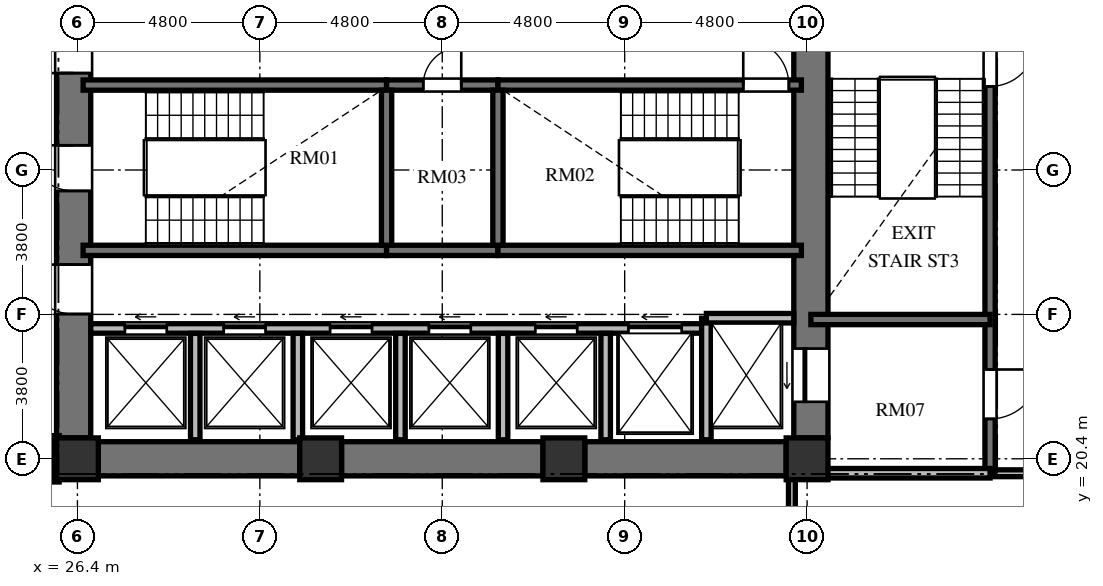
"""IFC4 building model, lengths in metres.
Left out: names, types, materials, properties, quantities, classifications, styles, units other than length and angle.
Written with IfcOpenShell. Run it as: python <this file> out.ifc"""

import sys

from ifc_helpers import new_model, si_unit, direction, frame, frame_2d, origin, origin_2d, place, context, subcontext, project, spatial, rectangle, extrude, element, fill, save


model = new_model("IFC4")
c1 = context("Model", 3, precision=1e-05, world=origin(), true_north=direction((0.0, 1.0)))
c2 = subcontext(c1, "Body", "Model", "MODEL_VIEW")
j1 = project(units=[si_unit("LENGTHUNIT", "METRE"), si_unit("PLANEANGLEUNIT", "RADIAN")], contexts=[c1])
p1 = place(None, origin())
s1 = spatial("IfcSite", under=j1, at=p1, CompositionType="ELEMENT")
p2 = place(p1, origin())
s2 = spatial("IfcBuilding", under=s1, at=p2, CompositionType="ELEMENT")
p3 = place(p2, frame((0.0, 0.0, 72.624)))
s3 = spatial("IfcBuildingStorey", under=s2, at=p3, CompositionType="ELEMENT", Elevation=72.624)
for number, where, z_axis, x_axis in (
    (1, (26.4, 20.4, 0.0), (0.0, 0.0, 1.0), (1.0, 0.0, 0.0)),
    (2, (32.8, 20.4, 0.0), (0.0, 0.0, 1.0), (1.0, 0.0, 0.0)),
    (3, (39.2, 20.4, 0.0), (0.0, 0.0, 1.0), (1.0, 0.0, 0.0)),
    (4, (45.6, 20.4, 0.0), (0.0, 0.0, 1.0), (1.0, 0.0, 0.0)),
):
    element("IfcColumn", number, at=place(p3, frame(where, z_axis=z_axis, x_axis=x_axis)), inside=s3, PredefinedType="COLUMN", context=c2, shape_type="SweptSolid", body=[
        extrude(rectangle(XDim=1.1, YDim=1.1, at=origin_2d()), origin(), (0.0, 0.0, 1.0), 3.648),
    ])
p4 = place(p3, frame((26.3, 20.95, 0.0), z_axis=(0.0, 0.0, 1.0), x_axis=(0.0, 1.0, 0.0)))
e5 = element("IfcWall", 5, at=p4, inside=s3, PredefinedType="SHEAR", context=c2, shape_type="SweptSolid", body=[
    extrude(rectangle(XDim=14.1, YDim=0.9, at=frame_2d((7.05, 0.0))), origin(), (0.0, 0.0, 1.0), 3.648),
])
p5 = place(p4, frame((6.5, 0.0, 0.0)))
e6 = element("IfcOpeningElement", 6, at=p5, cuts=e5, PredefinedType="OPENING", context=c2, shape_type="SweptSolid", body=[
    extrude(rectangle(XDim=1.2, YDim=2.15, at=frame_2d((0.6, 1.075))), frame((0.0, 0.46, 0.0), z_axis=(0.0, -1.0, 0.0), x_axis=(1.0, 0.0, 0.0)), (0.0, 0.0, 1.0), 0.92),
])
p6 = place(p4, frame((9.6, 0.0, 0.0)))
e7 = element("IfcOpeningElement", 7, at=p6, cuts=e5, PredefinedType="OPENING", context=c2, shape_type="SweptSolid", body=[
    extrude(rectangle(XDim=1.3, YDim=2.2, at=frame_2d((0.65, 1.1))), frame((0.0, 0.46, 0.0), z_axis=(0.0, -1.0, 0.0), x_axis=(1.0, 0.0, 0.0)), (0.0, 0.0, 1.0), 0.92),
])
p7 = place(p4, frame((3.26, 0.0, 0.0)))
e8 = element("IfcOpeningElement", 8, at=p7, cuts=e5, PredefinedType="OPENING", context=c2, shape_type="SweptSolid", body=[
    extrude(rectangle(XDim=1.3, YDim=2.2, at=frame_2d((0.65, 1.1))), frame((0.0, 0.46, 0.0), z_axis=(0.0, -1.0, 0.0), x_axis=(1.0, 0.0, 0.0)), (0.0, 0.0, 1.0), 0.92),
])
p8 = place(p3, frame((45.7, 20.95, 0.0), z_axis=(0.0, 0.0, 1.0), x_axis=(0.0, 1.0, 0.0)))
e9 = element("IfcWall", 9, at=p8, inside=s3, PredefinedType="SHEAR", context=c2, shape_type="SweptSolid", body=[
    extrude(rectangle(XDim=14.1, YDim=0.9, at=frame_2d((7.05, 0.0))), origin(), (0.0, 0.0, 1.0), 3.648),
])
p9 = place(p8, frame((11.75, 0.0, 0.0)))
e10 = element("IfcOpeningElement", 10, at=p9, cuts=e9, PredefinedType="OPENING", context=c2, shape_type="SweptSolid", body=[
    extrude(rectangle(XDim=1.4, YDim=2.3, at=frame_2d((0.7, 1.15))), frame((0.0, 0.46, 0.0), z_axis=(0.0, -1.0, 0.0), x_axis=(1.0, 0.0, 0.0)), (0.0, 0.0, 1.0), 0.92),
])
p10 = place(p8, frame((0.95, 0.0, 0.0)))
e11 = element("IfcOpeningElement", 11, at=p10, cuts=e9, PredefinedType="OPENING", context=c2, shape_type="SweptSolid", body=[
    extrude(rectangle(XDim=1.4, YDim=2.3, at=frame_2d((0.7, 1.15))), frame((0.0, 0.46, 0.0), z_axis=(0.0, -1.0, 0.0), x_axis=(1.0, 0.0, 0.0)), (0.0, 0.0, 1.0), 0.92),
])
p11 = place(p3, frame((26.95, 20.4, 0.0), z_axis=(0.0, 0.0, 1.0), x_axis=(1.0, 0.0, 0.0)))
e12 = element("IfcWall", 12, at=p11, inside=s3, PredefinedType="SHEAR", context=c2, shape_type="SweptSolid", body=[
    extrude(rectangle(XDim=5.3, YDim=0.9, at=frame_2d((2.65, 0.0))), origin(), (0.0, 0.0, 1.0), 3.648),
])
p12 = place(p3, frame((33.35, 20.4, 0.0), z_axis=(0.0, 0.0, 1.0), x_axis=(1.0, 0.0, 0.0)))
e13 = element("IfcWall", 13, at=p12, inside=s3, PredefinedType="SHEAR", context=c2, shape_type="SweptSolid", body=[
    extrude(rectangle(XDim=5.3, YDim=0.9, at=frame_2d((2.65, 0.0))), origin(), (0.0, 0.0, 1.0), 3.648),
])
p13 = place(p3, frame((39.75, 20.4, 0.0), z_axis=(0.0, 0.0, 1.0), x_axis=(1.0, 0.0, 0.0)))
e14 = element("IfcWall", 14, at=p13, inside=s3, PredefinedType="SHEAR", context=c2, shape_type="SweptSolid", body=[
    extrude(rectangle(XDim=5.3, YDim=0.9, at=frame_2d((2.65, 0.0))), origin(), (0.0, 0.0, 1.0), 3.648),
])
p14 = place(p3, frame((26.55, 30.235, 0.0), z_axis=(0.0, 0.0, 1.0), x_axis=(1.0, 0.0, 0.0)))
e15 = element("IfcWall", 15, at=p14, inside=s3, PredefinedType="SHEAR", context=c2, shape_type="SweptSolid", body=[
    extrude(rectangle(XDim=7.985, YDim=0.27, at=frame_2d((3.992, 0.0))), origin(), (0.0, 0.0, 1.0), 3.648),
])
p15 = place(p3, frame((34.535, 30.235, 0.0), z_axis=(0.0, 0.0, 1.0), x_axis=(1.0, 0.0, 0.0)))
e16 = element("IfcWall", 16, at=p15, inside=s3, PredefinedType="SHEAR", context=c2, shape_type="SweptSolid", body=[
    extrude(rectangle(XDim=2.93, YDim=0.27, at=frame_2d((1.465, 0.0))), origin(), (0.0, 0.0, 1.0), 3.648),
])
p16 = place(p15, frame((0.965, 0.0, 0.0)))
e17 = element("IfcOpeningElement", 17, at=p16, cuts=e16, PredefinedType="OPENING", context=c2, shape_type="SweptSolid", body=[
    extrude(rectangle(XDim=1.0, YDim=2.1, at=frame_2d((0.5, 1.05))), frame((0.0, 0.145, 0.0), z_axis=(0.0, -1.0, 0.0), x_axis=(1.0, 0.0, 0.0)), (0.0, 0.0, 1.0), 0.29),
])
p17 = place(p3, frame((37.465, 30.235, 0.0), z_axis=(0.0, 0.0, 1.0), x_axis=(1.0, 0.0, 0.0)))
e18 = element("IfcWall", 18, at=p17, inside=s3, PredefinedType="SHEAR", context=c2, shape_type="SweptSolid", body=[
    extrude(rectangle(XDim=7.985, YDim=0.27, at=frame_2d((3.992, 0.0))), origin(), (0.0, 0.0, 1.0), 3.648),
])
p18 = place(p17, frame((6.455, 0.0, 0.0)))
e19 = element("IfcOpeningElement", 19, at=p18, cuts=e18, PredefinedType="OPENING", context=c2, shape_type="SweptSolid", body=[
    extrude(rectangle(XDim=1.2, YDim=2.15, at=frame_2d((0.6, 1.075))), frame((0.0, 0.145, 0.0), z_axis=(0.0, -1.0, 0.0), x_axis=(1.0, 0.0, 0.0)), (0.0, 0.0, 1.0), 0.29),
])
p19 = place(p3, frame((26.55, 25.885, 0.0), z_axis=(0.0, 0.0, 1.0), x_axis=(1.0, 0.0, 0.0)))
e20 = element("IfcWall", 20, at=p19, inside=s3, PredefinedType="SHEAR", context=c2, shape_type="SweptSolid", body=[
    extrude(rectangle(XDim=7.985, YDim=0.27, at=frame_2d((3.992, 0.0))), origin(), (0.0, 0.0, 1.0), 3.648),
])
p20 = place(p3, frame((34.535, 25.885, 0.0), z_axis=(0.0, 0.0, 1.0), x_axis=(1.0, 0.0, 0.0)))
e21 = element("IfcWall", 21, at=p20, inside=s3, PredefinedType="SHEAR", context=c2, shape_type="SweptSolid", body=[
    extrude(rectangle(XDim=2.93, YDim=0.27, at=frame_2d((1.465, 0.0))), origin(), (0.0, 0.0, 1.0), 3.648),
])
p21 = place(p3, frame((37.465, 25.885, 0.0), z_axis=(0.0, 0.0, 1.0), x_axis=(1.0, 0.0, 0.0)))
e22 = element("IfcWall", 22, at=p21, inside=s3, PredefinedType="SHEAR", context=c2, shape_type="SweptSolid", body=[
    extrude(rectangle(XDim=7.985, YDim=0.27, at=frame_2d((3.992, 0.0))), origin(), (0.0, 0.0, 1.0), 3.648),
])
for number, where, z_axis, x_axis in (
    (23, (34.535, 26.02, 0.0), (0.0, 0.0, 1.0), (0.0, 1.0, 0.0)),
    (24, (37.465, 26.02, 0.0), (0.0, 0.0, 1.0), (0.0, 1.0, 0.0)),
):
    element("IfcWall", number, at=place(p3, frame(where, z_axis=z_axis, x_axis=x_axis)), inside=s3, PredefinedType="SHEAR", context=c2, shape_type="SweptSolid", body=[
        extrude(rectangle(XDim=4.08, YDim=0.27, at=frame_2d((2.04, 0.0))), origin(), (0.0, 0.0, 1.0), 3.648),
    ])
p22 = place(p3, frame((26.75, 23.83, 0.0), z_axis=(0.0, 0.0, 1.0), x_axis=(1.0, 0.0, 0.0)))
e25 = element("IfcWall", 25, at=p22, inside=s3, PredefinedType="SOLIDWALL", context=c2, shape_type="SweptSolid", body=[
    extrude(rectangle(XDim=16.2, YDim=0.25, at=frame_2d((8.1, 0.0))), origin(), (0.0, 0.0, 1.0), 3.198),
])
p23 = place(p22, frame((0.9, 0.0, 0.0)))
e26 = element("IfcOpeningElement", 26, at=p23, cuts=e25, PredefinedType="OPENING", context=c2, shape_type="SweptSolid", body=[
    extrude(rectangle(XDim=1.1, YDim=2.2, at=frame_2d((0.55, 1.1))), frame((0.0, 0.135, 0.0), z_axis=(0.0, -1.0, 0.0), x_axis=(1.0, 0.0, 0.0)), (0.0, 0.0, 1.0), 0.27),
])
p24 = place(p22, frame((3.5, 0.0, 0.0)))
e27 = element("IfcOpeningElement", 27, at=p24, cuts=e25, PredefinedType="OPENING", context=c2, shape_type="SweptSolid", body=[
    extrude(rectangle(XDim=1.1, YDim=2.2, at=frame_2d((0.55, 1.1))), frame((0.0, 0.135, 0.0), z_axis=(0.0, -1.0, 0.0), x_axis=(1.0, 0.0, 0.0)), (0.0, 0.0, 1.0), 0.27),
])
p25 = place(p22, frame((6.3, 0.0, 0.0)))
e28 = element("IfcOpeningElement", 28, at=p25, cuts=e25, PredefinedType="OPENING", context=c2, shape_type="SweptSolid", body=[
    extrude(rectangle(XDim=1.1, YDim=2.2, at=frame_2d((0.55, 1.1))), frame((0.0, 0.135, 0.0), z_axis=(0.0, -1.0, 0.0), x_axis=(1.0, 0.0, 0.0)), (0.0, 0.0, 1.0), 0.27),
])
p26 = place(p22, frame((8.9, 0.0, 0.0)))
e29 = element("IfcOpeningElement", 29, at=p26, cuts=e25, PredefinedType="OPENING", context=c2, shape_type="SweptSolid", body=[
    extrude(rectangle(XDim=1.1, YDim=2.2, at=frame_2d((0.55, 1.1))), frame((0.0, 0.135, 0.0), z_axis=(0.0, -1.0, 0.0), x_axis=(1.0, 0.0, 0.0)), (0.0, 0.0, 1.0), 0.27),
])
p27 = place(p22, frame((11.7, 0.0, 0.0)))
e30 = element("IfcOpeningElement", 30, at=p27, cuts=e25, PredefinedType="OPENING", context=c2, shape_type="SweptSolid", body=[
    extrude(rectangle(XDim=1.1, YDim=2.2, at=frame_2d((0.55, 1.1))), frame((0.0, 0.135, 0.0), z_axis=(0.0, -1.0, 0.0), x_axis=(1.0, 0.0, 0.0)), (0.0, 0.0, 1.0), 0.27),
])
p28 = place(p22, frame((14.15, 0.0, 0.0)))
e31 = element("IfcOpeningElement", 31, at=p28, cuts=e25, PredefinedType="OPENING", context=c2, shape_type="SweptSolid", body=[
    extrude(rectangle(XDim=1.4, YDim=2.3, at=frame_2d((0.7, 1.15))), frame((0.0, 0.135, 0.0), z_axis=(0.0, -1.0, 0.0), x_axis=(1.0, 0.0, 0.0)), (0.0, 0.0, 1.0), 0.27),
])
p29 = place(p3, frame((42.95, 20.9, 0.0), z_axis=(0.0, 0.0, 1.0), x_axis=(0.0, 1.0, 0.0)))
e32 = element("IfcWall", 32, at=p29, inside=s3, PredefinedType="SOLIDWALL", context=c2, shape_type="SweptSolid", body=[
    extrude(rectangle(XDim=3.2, YDim=0.25, at=frame_2d((1.6, 0.0))), origin(), (0.0, 0.0, 1.0), 3.198),
])
p30 = place(p3, frame((42.95, 24.1, 0.0), z_axis=(0.0, 0.0, 1.0), x_axis=(1.0, 0.0, 0.0)))
e33 = element("IfcWall", 33, at=p30, inside=s3, PredefinedType="SOLIDWALL", context=c2, shape_type="SweptSolid", body=[
    extrude(rectangle(XDim=2.3, YDim=0.25, at=frame_2d((1.15, 0.0))), origin(), (0.0, 0.0, 1.0), 3.198),
])
for number, where, z_axis, x_axis in (
    (34, (29.5, 20.9, 0.0), (0.0, 0.0, 1.0), (0.0, 1.0, 0.0)),
    (35, (32.2, 20.9, 0.0), (0.0, 0.0, 1.0), (0.0, 1.0, 0.0)),
    (36, (34.9, 20.9, 0.0), (0.0, 0.0, 1.0), (0.0, 1.0, 0.0)),
    (37, (37.6, 20.9, 0.0), (0.0, 0.0, 1.0), (0.0, 1.0, 0.0)),
    (38, (40.3, 20.9, 0.0), (0.0, 0.0, 1.0), (0.0, 1.0, 0.0)),
):
    element("IfcWall", number, at=place(p3, frame(where, z_axis=z_axis, x_axis=x_axis)), inside=s3, PredefinedType="SOLIDWALL", context=c2, shape_type="SweptSolid", body=[
        extrude(rectangle(XDim=2.8, YDim=0.25, at=frame_2d((1.4, 0.0))), origin(), (0.0, 0.0, 1.0), 3.198),
    ])
p31 = place(p3, frame((50.415, 35.845, 0.0), z_axis=(0.0, 0.0, 1.0), x_axis=(0.0, -1.0, 0.0)))
e39 = element("IfcWall", 39, at=p31, inside=s3, PredefinedType="SHEAR", context=c2, shape_type="SweptSolid", body=[
    extrude(rectangle(XDim=15.825, YDim=0.27, at=frame_2d((7.913, 0.0))), origin(), (0.0, 0.0, 1.0), 3.648),
])
p32 = place(p31, frame((4.445, 0.0, 0.0)))
e40 = element("IfcOpeningElement", 40, at=p32, cuts=e39, PredefinedType="OPENING", context=c2, shape_type="SweptSolid", body=[
    extrude(rectangle(XDim=1.2, YDim=2.15, at=frame_2d((0.6, 1.075))), frame((0.0, 0.145, 0.0), z_axis=(0.0, -1.0, 0.0), x_axis=(1.0, 0.0, 0.0)), (0.0, 0.0, 1.0), 0.29),
])
p33 = place(p31, frame((1.295, 0.0, 0.0)))
e41 = element("IfcOpeningElement", 41, at=p33, cuts=e39, PredefinedType="OPENING", context=c2, shape_type="SweptSolid", body=[
    extrude(rectangle(XDim=1.3, YDim=2.2, at=frame_2d((0.65, 1.1))), frame((0.0, 0.145, 0.0), z_axis=(0.0, -1.0, 0.0), x_axis=(1.0, 0.0, 0.0)), (0.0, 0.0, 1.0), 0.29),
])
p34 = place(p31, frame((13.095, 0.0, 0.0)))
e42 = element("IfcOpeningElement", 42, at=p34, cuts=e39, PredefinedType="OPENING", context=c2, shape_type="SweptSolid", body=[
    extrude(rectangle(XDim=1.3, YDim=2.2, at=frame_2d((0.65, 1.1))), frame((0.0, 0.145, 0.0), z_axis=(0.0, -1.0, 0.0), x_axis=(1.0, 0.0, 0.0)), (0.0, 0.0, 1.0), 0.29),
])
p35 = place(p3, frame((45.7, 24.065, 0.0), z_axis=(0.0, 0.0, 1.0), x_axis=(1.0, 0.0, 0.0)))
e43 = element("IfcWall", 43, at=p35, inside=s3, PredefinedType="SHEAR", context=c2, shape_type="SweptSolid", body=[
    extrude(rectangle(XDim=4.715, YDim=0.27, at=frame_2d((2.357, 0.0))), origin(), (0.0, 0.0, 1.0), 3.648),
])
p36 = place(p3, frame((45.7, 20.02, 0.0), z_axis=(0.0, 0.0, 1.0), x_axis=(1.0, 0.0, 0.0)))
e44 = element("IfcWall", 44, at=p36, inside=s3, PredefinedType="SOLIDWALL", context=c2, shape_type="SweptSolid", body=[
    extrude(rectangle(XDim=4.715, YDim=0.25, at=frame_2d((2.357, 0.0))), origin(), (0.0, 0.0, 1.0), 2.583),
])
p37 = place(p3, frame((53.19, 20.02, 0.0), z_axis=(0.0, 0.0, 1.0), x_axis=(-1.0, 0.0, 0.0)))
e45 = element("IfcWall", 45, at=p37, inside=s3, PredefinedType="PARTITIONING", context=c2, shape_type="SweptSolid", body=[
    extrude(rectangle(XDim=2.65, YDim=0.18, at=frame_2d((1.325, 0.0))), origin(), (0.0, 0.0, 1.0), 2.583),
])
p38 = place(p3, frame((25.83, 21.01, 0.0), z_axis=(0.0, 0.0, 1.0), x_axis=(0.0, -1.0, 0.0)))
e46 = element("IfcWall", 46, at=p38, inside=s3, PredefinedType="PARTITIONING", context=c2, shape_type="SweptSolid", body=[
    extrude(rectangle(XDim=1.22, YDim=0.18, at=frame_2d((0.61, 0.0))), origin(), (0.0, 0.0, 1.0), 3.198),
])
p39 = place(p3, frame((45.2, 19.91, 0.0), z_axis=(0.0, 0.0, 1.0), x_axis=(0.0, -1.0, 0.0)))
e47 = element("IfcWall", 47, at=p39, inside=s3, PredefinedType="PARTITIONING", context=c2, shape_type="SweptSolid", body=[
    extrude(rectangle(XDim=2.55, YDim=0.18, at=frame_2d((1.275, 0.0))), origin(), (0.0, 0.0, 1.0), 3.198),
])
p40 = place(p5, origin())
e48 = element("IfcDoor", 48, at=p40, inside=s3, OperationType="SINGLE_SWING_RIGHT", PredefinedType="DOOR", context=c2, shape_type="SweptSolid", body=[
    extrude(rectangle(XDim=1.2, YDim=2.15, at=frame_2d((0.6, 1.075))), frame((0.0, 0.025, 0.0), z_axis=(0.0, -1.0, 0.0), x_axis=(1.0, 0.0, 0.0)), (0.0, 0.0, 1.0), 0.05),
])
fill(e6, e48)
p41 = place(p18, origin())
e49 = element("IfcDoor", 49, at=p41, inside=s3, OperationType="SINGLE_SWING_LEFT", PredefinedType="DOOR", context=c2, shape_type="SweptSolid", body=[
    extrude(rectangle(XDim=1.2, YDim=2.15, at=frame_2d((0.6, 1.075))), frame((0.0, 0.025, 0.0), z_axis=(0.0, -1.0, 0.0), x_axis=(1.0, 0.0, 0.0)), (0.0, 0.0, 1.0), 0.05),
])
fill(e19, e49)
p42 = place(p16, origin())
e50 = element("IfcDoor", 50, at=p42, inside=s3, OperationType="SINGLE_SWING_RIGHT", PredefinedType="DOOR", context=c2, shape_type="SweptSolid", body=[
    extrude(rectangle(XDim=1.0, YDim=2.1, at=frame_2d((0.5, 1.05))), frame((0.0, 0.025, 0.0), z_axis=(0.0, -1.0, 0.0), x_axis=(1.0, 0.0, 0.0)), (0.0, 0.0, 1.0), 0.05),
])
fill(e17, e50)
p43 = place(p6, origin())
e51 = element("IfcDoor", 51, at=p43, inside=s3, OperationType="SINGLE_SWING_LEFT", PredefinedType="DOOR", context=c2, shape_type="SweptSolid", body=[
    extrude(rectangle(XDim=1.3, YDim=2.2, at=frame_2d((0.65, 1.1))), frame((0.0, 0.025, 0.0), z_axis=(0.0, -1.0, 0.0), x_axis=(1.0, 0.0, 0.0)), (0.0, 0.0, 1.0), 0.05),
])
fill(e7, e51)
p44 = place(p7, origin())
e52 = element("IfcDoor", 52, at=p44, inside=s3, OperationType="SINGLE_SWING_RIGHT", PredefinedType="DOOR", context=c2, shape_type="SweptSolid", body=[
    extrude(rectangle(XDim=1.3, YDim=2.2, at=frame_2d((0.65, 1.1))), frame((0.0, 0.025, 0.0), z_axis=(0.0, -1.0, 0.0), x_axis=(1.0, 0.0, 0.0)), (0.0, 0.0, 1.0), 0.05),
])
fill(e8, e52)
p45 = place(p23, origin())
e53 = element("IfcDoor", 53, at=p45, inside=s3, OperationType="SLIDING_TO_LEFT", PredefinedType="DOOR", context=c2, shape_type="SweptSolid", body=[
    extrude(rectangle(XDim=1.1, YDim=2.2, at=frame_2d((0.55, 1.1))), frame((0.0, 0.025, 0.0), z_axis=(0.0, -1.0, 0.0), x_axis=(1.0, 0.0, 0.0)), (0.0, 0.0, 1.0), 0.05),
])
fill(e26, e53)
p46 = place(p24, origin())
e54 = element("IfcDoor", 54, at=p46, inside=s3, OperationType="SLIDING_TO_LEFT", PredefinedType="DOOR", context=c2, shape_type="SweptSolid", body=[
    extrude(rectangle(XDim=1.1, YDim=2.2, at=frame_2d((0.55, 1.1))), frame((0.0, 0.025, 0.0), z_axis=(0.0, -1.0, 0.0), x_axis=(1.0, 0.0, 0.0)), (0.0, 0.0, 1.0), 0.05),
])
fill(e27, e54)
p47 = place(p25, origin())
e55 = element("IfcDoor", 55, at=p47, inside=s3, OperationType="SLIDING_TO_LEFT", PredefinedType="DOOR", context=c2, shape_type="SweptSolid", body=[
    extrude(rectangle(XDim=1.1, YDim=2.2, at=frame_2d((0.55, 1.1))), frame((0.0, 0.025, 0.0), z_axis=(0.0, -1.0, 0.0), x_axis=(1.0, 0.0, 0.0)), (0.0, 0.0, 1.0), 0.05),
])
fill(e28, e55)
p48 = place(p26, origin())
e56 = element("IfcDoor", 56, at=p48, inside=s3, OperationType="SLIDING_TO_LEFT", PredefinedType="DOOR", context=c2, shape_type="SweptSolid", body=[
    extrude(rectangle(XDim=1.1, YDim=2.2, at=frame_2d((0.55, 1.1))), frame((0.0, 0.025, 0.0), z_axis=(0.0, -1.0, 0.0), x_axis=(1.0, 0.0, 0.0)), (0.0, 0.0, 1.0), 0.05),
])
fill(e29, e56)
p49 = place(p27, origin())
e57 = element("IfcDoor", 57, at=p49, inside=s3, OperationType="SLIDING_TO_LEFT", PredefinedType="DOOR", context=c2, shape_type="SweptSolid", body=[
    extrude(rectangle(XDim=1.1, YDim=2.2, at=frame_2d((0.55, 1.1))), frame((0.0, 0.025, 0.0), z_axis=(0.0, -1.0, 0.0), x_axis=(1.0, 0.0, 0.0)), (0.0, 0.0, 1.0), 0.05),
])
fill(e30, e57)
p50 = place(p10, origin())
e58 = element("IfcDoor", 58, at=p50, inside=s3, OperationType="SLIDING_TO_LEFT", PredefinedType="DOOR", context=c2, shape_type="SweptSolid", body=[
    extrude(rectangle(XDim=1.4, YDim=2.3, at=frame_2d((0.7, 1.15))), frame((0.0, 0.025, 0.0), z_axis=(0.0, -1.0, 0.0), x_axis=(1.0, 0.0, 0.0)), (0.0, 0.0, 1.0), 0.05),
])
fill(e11, e58)
p51 = place(p28, origin())
e59 = element("IfcDoor", 59, at=p51, inside=s3, OperationType="SLIDING_TO_LEFT", PredefinedType="DOOR", context=c2, shape_type="SweptSolid", body=[
    extrude(rectangle(XDim=1.4, YDim=2.3, at=frame_2d((0.7, 1.15))), frame((0.0, 0.025, 0.0), z_axis=(0.0, -1.0, 0.0), x_axis=(1.0, 0.0, 0.0)), (0.0, 0.0, 1.0), 0.05),
])
fill(e31, e59)
p52 = place(p32, origin())
e60 = element("IfcDoor", 60, at=p52, inside=s3, OperationType="SINGLE_SWING_LEFT", PredefinedType="DOOR", context=c2, shape_type="SweptSolid", body=[
    extrude(rectangle(XDim=1.2, YDim=2.15, at=frame_2d((0.6, 1.075))), frame((0.0, 0.025, 0.0), z_axis=(0.0, -1.0, 0.0), x_axis=(1.0, 0.0, 0.0)), (0.0, 0.0, 1.0), 0.05),
])
fill(e40, e60)
p53 = place(p34, origin())
e61 = element("IfcDoor", 61, at=p53, inside=s3, OperationType="SINGLE_SWING_LEFT", PredefinedType="DOOR", context=c2, shape_type="SweptSolid", body=[
    extrude(rectangle(XDim=1.3, YDim=2.2, at=frame_2d((0.65, 1.1))), frame((0.0, 0.025, 0.0), z_axis=(0.0, -1.0, 0.0), x_axis=(1.0, 0.0, 0.0)), (0.0, 0.0, 1.0), 0.05),
])
fill(e42, e61)
save(model, sys.argv[1])
